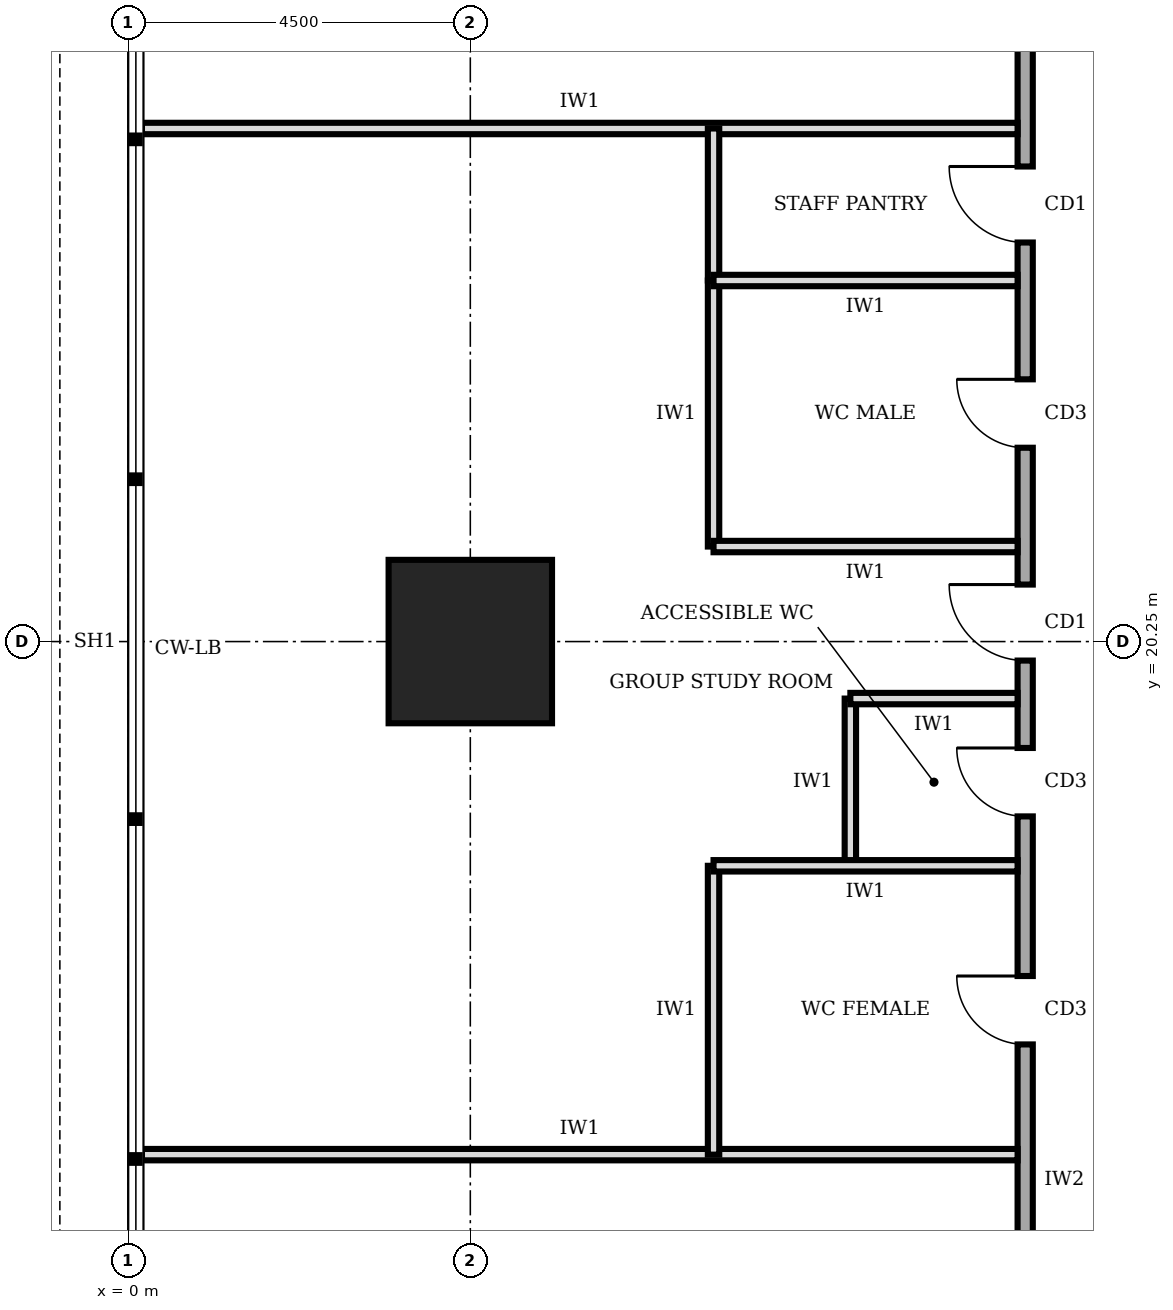
"""IFC4 building model, lengths in metres.
Left out: names, types, materials, properties, quantities, classifications, styles, units other than length and angle.
Written with IfcOpenShell. Run it as: python <this file> out.ifc"""

import sys

from ifc_helpers import new_model, si_unit, direction, frame, frame_2d, origin, origin_2d, place, context, subcontext, project, spatial, rectangle, extrude, element, fill, save


model = new_model("IFC4")
c1 = context("Model", 3, precision=1e-05, world=origin(), true_north=direction((0.0, 1.0)))
c2 = subcontext(c1, "Body", "Model", "MODEL_VIEW")
j1 = project(units=[si_unit("LENGTHUNIT", "METRE"), si_unit("PLANEANGLEUNIT", "RADIAN")], contexts=[c1])
p1 = place(None, origin())
s1 = spatial("IfcSite", under=j1, at=p1, CompositionType="ELEMENT")
p2 = place(p1, origin())
s2 = spatial("IfcBuilding", under=s1, at=p2, CompositionType="ELEMENT")
p3 = place(p2, frame((0.0, 0.0, 269.0)))
s3 = spatial("IfcBuildingStorey", under=s2, at=p3, CompositionType="ELEMENT", Elevation=269.0)
p4 = place(p3, frame((4.5, 20.25, 0.0), z_axis=(0.0, 0.0, 1.0), x_axis=(1.0, 0.0, 0.0)))
e1 = element("IfcColumn", 1, at=p4, inside=s3, PredefinedType="COLUMN", context=c2, shape_type="SweptSolid", body=[
    extrude(rectangle(XDim=2.15, YDim=2.15, at=origin_2d()), origin(), (0.0, 0.0, 1.0), 4.0),
])
p5 = place(p3, frame((11.8, 32.05, 0.0), z_axis=(0.0, 0.0, 1.0), x_axis=(0.0, -1.0, 0.0)))
e2 = element("IfcWall", 2, at=p5, inside=s3, PredefinedType="SOLIDWALL", context=c2, shape_type="SweptSolid", body=[
    extrude(rectangle(XDim=23.8, YDim=0.2, at=frame_2d((11.9, 0.0))), origin(), (0.0, 0.0, 1.0), 3.75),
])
p6 = place(p5, frame((20.675, 0.0, 0.0)))
e3 = element("IfcOpeningElement", 3, at=p6, cuts=e2, PredefinedType="OPENING", context=c2, shape_type="SweptSolid", body=[
    extrude(rectangle(XDim=1.0, YDim=2.1, at=frame_2d((0.5, 1.05))), frame((0.0, 0.11, 0.0), z_axis=(0.0, -1.0, 0.0), x_axis=(1.0, 0.0, 0.0)), (0.0, 0.0, 1.0), 0.22),
])
p7 = place(p5, frame((16.2, 0.0, 0.0)))
e4 = element("IfcOpeningElement", 4, at=p7, cuts=e2, PredefinedType="OPENING", context=c2, shape_type="SweptSolid", body=[
    extrude(rectangle(XDim=0.9, YDim=2.1, at=frame_2d((0.45, 1.05))), frame((0.0, 0.11, 0.0), z_axis=(0.0, -1.0, 0.0), x_axis=(1.0, 0.0, 0.0)), (0.0, 0.0, 1.0), 0.22),
])
p8 = place(p5, frame((13.2, 0.0, 0.0)))
e5 = element("IfcOpeningElement", 5, at=p8, cuts=e2, PredefinedType="OPENING", context=c2, shape_type="SweptSolid", body=[
    extrude(rectangle(XDim=0.9, YDim=2.1, at=frame_2d((0.45, 1.05))), frame((0.0, 0.11, 0.0), z_axis=(0.0, -1.0, 0.0), x_axis=(1.0, 0.0, 0.0)), (0.0, 0.0, 1.0), 0.22),
])
p9 = place(p5, frame((8.35, 0.0, 0.0)))
e6 = element("IfcOpeningElement", 6, at=p9, cuts=e2, PredefinedType="OPENING", context=c2, shape_type="SweptSolid", body=[
    extrude(rectangle(XDim=0.9, YDim=2.1, at=frame_2d((0.45, 1.05))), frame((0.0, 0.11, 0.0), z_axis=(0.0, -1.0, 0.0), x_axis=(1.0, 0.0, 0.0)), (0.0, 0.0, 1.0), 0.22),
])
p10 = place(p5, frame((5.55, 0.0, 0.0)))
e7 = element("IfcOpeningElement", 7, at=p10, cuts=e2, PredefinedType="OPENING", context=c2, shape_type="SweptSolid", body=[
    extrude(rectangle(XDim=1.0, YDim=2.1, at=frame_2d((0.5, 1.05))), frame((0.0, 0.11, 0.0), z_axis=(0.0, -1.0, 0.0), x_axis=(1.0, 0.0, 0.0)), (0.0, 0.0, 1.0), 0.22),
])
p11 = place(p5, frame((11.05, 0.0, 0.0)))
e8 = element("IfcOpeningElement", 8, at=p11, cuts=e2, PredefinedType="OPENING", context=c2, shape_type="SweptSolid", body=[
    extrude(rectangle(XDim=1.0, YDim=2.1, at=frame_2d((0.5, 1.05))), frame((0.0, 0.11, 0.0), z_axis=(0.0, -1.0, 0.0), x_axis=(1.0, 0.0, 0.0)), (0.0, 0.0, 1.0), 0.22),
])
p12 = place(p5, frame((1.925, 0.0, 0.0)))
e9 = element("IfcOpeningElement", 9, at=p12, cuts=e2, PredefinedType="OPENING", context=c2, shape_type="SweptSolid", body=[
    extrude(rectangle(XDim=1.0, YDim=2.1, at=frame_2d((0.5, 1.05))), frame((0.0, 0.11, 0.0), z_axis=(0.0, -1.0, 0.0), x_axis=(1.0, 0.0, 0.0)), (0.0, 0.0, 1.0), 0.22),
])
for number, where, z_axis, x_axis in (
    (10, (0.18, 13.5, 0.0), (0.0, 0.0, 1.0), (1.0, 0.0, 0.0)),
    (11, (0.18, 27.0, 0.0), (0.0, 0.0, 1.0), (1.0, 0.0, 0.0)),
):
    element("IfcWall", number, at=place(p3, frame(where, z_axis=z_axis, x_axis=x_axis)), inside=s3, PredefinedType="PARTITIONING", context=c2, shape_type="SweptSolid", body=[
        extrude(rectangle(XDim=11.52, YDim=0.15, at=frame_2d((5.76, 0.0))), origin(), (0.0, 0.0, 1.0), 3.75),
    ])
p13 = place(p3, frame((11.7, 17.3, 0.0), z_axis=(0.0, 0.0, 1.0), x_axis=(-1.0, 0.0, 0.0)))
e12 = element("IfcWall", 12, at=p13, inside=s3, PredefinedType="PARTITIONING", context=c2, shape_type="SweptSolid", body=[
    extrude(rectangle(XDim=4.0, YDim=0.15, at=frame_2d((2.0, 0.0))), origin(), (0.0, 0.0, 1.0), 3.75),
])
p14 = place(p3, frame((11.7, 19.5, 0.0), z_axis=(0.0, 0.0, 1.0), x_axis=(-1.0, 0.0, 0.0)))
e13 = element("IfcWall", 13, at=p14, inside=s3, PredefinedType="PARTITIONING", context=c2, shape_type="SweptSolid", body=[
    extrude(rectangle(XDim=2.2, YDim=0.15, at=frame_2d((1.1, 0.0))), origin(), (0.0, 0.0, 1.0), 2.85),
])
for number, where, z_axis, x_axis in (
    (14, (11.7, 21.5, 0.0), (0.0, 0.0, 1.0), (-1.0, 0.0, 0.0)),
    (15, (11.7, 25.0, 0.0), (0.0, 0.0, 1.0), (-1.0, 0.0, 0.0)),
):
    element("IfcWall", number, at=place(p3, frame(where, z_axis=z_axis, x_axis=x_axis)), inside=s3, PredefinedType="PARTITIONING", context=c2, shape_type="SweptSolid", body=[
        extrude(rectangle(XDim=4.0, YDim=0.15, at=frame_2d((2.0, 0.0))), origin(), (0.0, 0.0, 1.0), 3.75),
    ])
p15 = place(p3, frame((7.7, 13.5, 0.0), z_axis=(0.0, 0.0, 1.0), x_axis=(0.0, 1.0, 0.0)))
e16 = element("IfcWall", 16, at=p15, inside=s3, PredefinedType="PARTITIONING", context=c2, shape_type="SweptSolid", body=[
    extrude(rectangle(XDim=3.8, YDim=0.15, at=frame_2d((1.9, 0.0))), origin(), (0.0, 0.0, 1.0), 3.75),
])
p16 = place(p3, frame((9.5, 17.3, 0.0), z_axis=(0.0, 0.0, 1.0), x_axis=(0.0, 1.0, 0.0)))
e17 = element("IfcWall", 17, at=p16, inside=s3, PredefinedType="PARTITIONING", context=c2, shape_type="SweptSolid", body=[
    extrude(rectangle(XDim=2.2, YDim=0.15, at=frame_2d((1.1, 0.0))), origin(), (0.0, 0.0, 1.0), 3.75),
])
p17 = place(p3, frame((7.7, 21.5, 0.0), z_axis=(0.0, 0.0, 1.0), x_axis=(0.0, 1.0, 0.0)))
e18 = element("IfcWall", 18, at=p17, inside=s3, PredefinedType="PARTITIONING", context=c2, shape_type="SweptSolid", body=[
    extrude(rectangle(XDim=3.5, YDim=0.15, at=frame_2d((1.75, 0.0))), origin(), (0.0, 0.0, 1.0), 3.75),
])
p18 = place(p3, frame((7.7, 25.0, 0.0), z_axis=(0.0, 0.0, 1.0), x_axis=(0.0, 1.0, 0.0)))
e19 = element("IfcWall", 19, at=p18, inside=s3, PredefinedType="PARTITIONING", context=c2, shape_type="SweptSolid", body=[
    extrude(rectangle(XDim=2.0, YDim=0.15, at=frame_2d((1.0, 0.0))), origin(), (0.0, 0.0, 1.0), 3.75),
])
p19 = place(p7, frame((0.9, 0.0, 0.0), z_axis=(0.0, 0.0, 1.0), x_axis=(-1.0, 0.0, 0.0)))
e20 = element("IfcDoor", 20, at=p19, inside=s3, OperationType="SINGLE_SWING_RIGHT", PredefinedType="DOOR", context=c2, shape_type="SweptSolid", body=[
    extrude(rectangle(XDim=0.9, YDim=2.1, at=frame_2d((0.45, 1.05))), frame((0.0, 0.025, 0.0), z_axis=(0.0, -1.0, 0.0), x_axis=(1.0, 0.0, 0.0)), (0.0, 0.0, 1.0), 0.05),
])
fill(e4, e20)
p20 = place(p8, frame((0.9, 0.0, 0.0), z_axis=(0.0, 0.0, 1.0), x_axis=(-1.0, 0.0, 0.0)))
e21 = element("IfcDoor", 21, at=p20, inside=s3, OperationType="SINGLE_SWING_RIGHT", PredefinedType="DOOR", context=c2, shape_type="SweptSolid", body=[
    extrude(rectangle(XDim=0.9, YDim=2.1, at=frame_2d((0.45, 1.05))), frame((0.0, 0.025, 0.0), z_axis=(0.0, -1.0, 0.0), x_axis=(1.0, 0.0, 0.0)), (0.0, 0.0, 1.0), 0.05),
])
fill(e5, e21)
p21 = place(p9, frame((0.9, 0.0, 0.0), z_axis=(0.0, 0.0, 1.0), x_axis=(-1.0, 0.0, 0.0)))
e22 = element("IfcDoor", 22, at=p21, inside=s3, OperationType="SINGLE_SWING_RIGHT", PredefinedType="DOOR", context=c2, shape_type="SweptSolid", body=[
    extrude(rectangle(XDim=0.9, YDim=2.1, at=frame_2d((0.45, 1.05))), frame((0.0, 0.025, 0.0), z_axis=(0.0, -1.0, 0.0), x_axis=(1.0, 0.0, 0.0)), (0.0, 0.0, 1.0), 0.05),
])
fill(e6, e22)
p22 = place(p10, frame((1.0, 0.0, 0.0), z_axis=(0.0, 0.0, 1.0), x_axis=(-1.0, 0.0, 0.0)))
e23 = element("IfcDoor", 23, at=p22, inside=s3, OperationType="SINGLE_SWING_RIGHT", PredefinedType="DOOR", context=c2, shape_type="SweptSolid", body=[
    extrude(rectangle(XDim=1.0, YDim=2.1, at=frame_2d((0.5, 1.05))), frame((0.0, 0.025, 0.0), z_axis=(0.0, -1.0, 0.0), x_axis=(1.0, 0.0, 0.0)), (0.0, 0.0, 1.0), 0.05),
])
fill(e7, e23)
p23 = place(p11, frame((1.0, 0.0, 0.0), z_axis=(0.0, 0.0, 1.0), x_axis=(-1.0, 0.0, 0.0)))
e24 = element("IfcDoor", 24, at=p23, inside=s3, OperationType="SINGLE_SWING_RIGHT", PredefinedType="DOOR", context=c2, shape_type="SweptSolid", body=[
    extrude(rectangle(XDim=1.0, YDim=2.1, at=frame_2d((0.5, 1.05))), frame((0.0, 0.025, 0.0), z_axis=(0.0, -1.0, 0.0), x_axis=(1.0, 0.0, 0.0)), (0.0, 0.0, 1.0), 0.05),
])
fill(e8, e24)
save(model, sys.argv[1])
